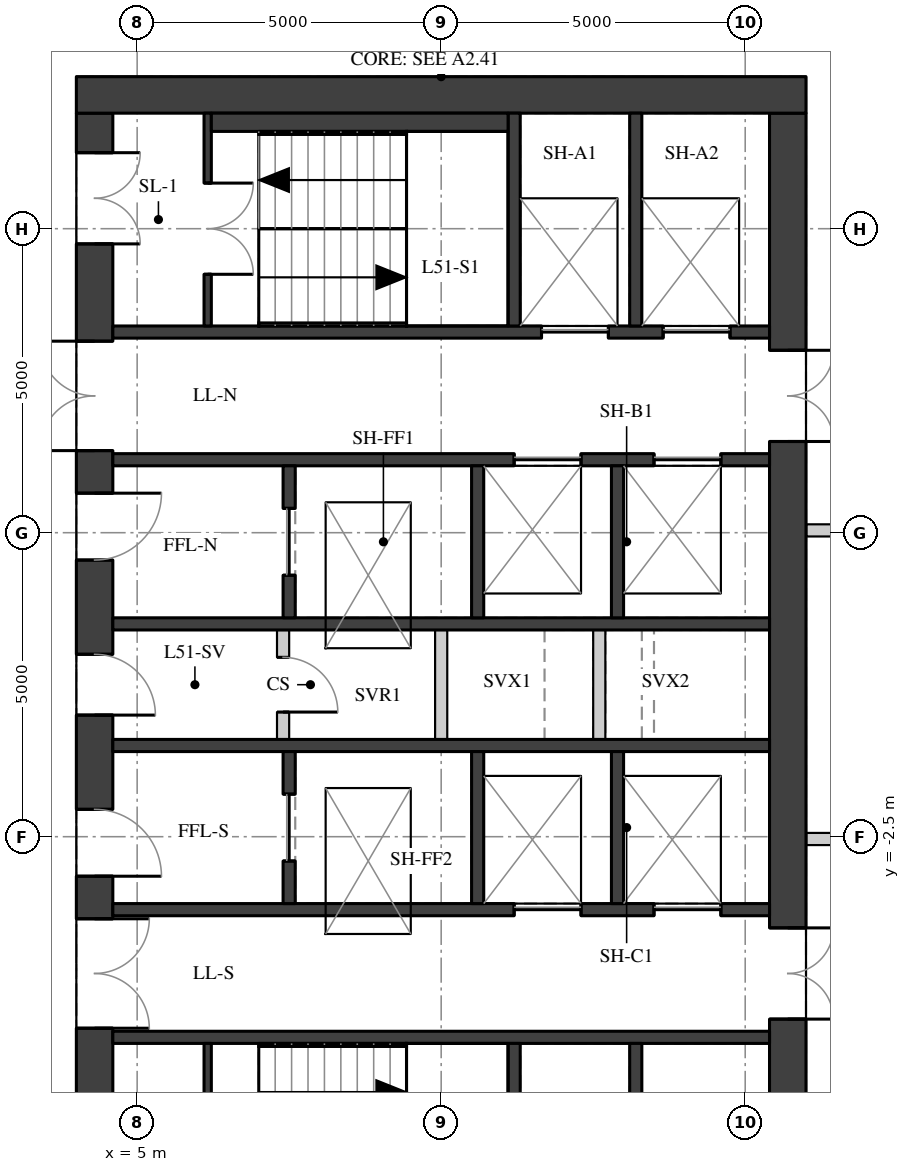
"""IFC4 building model, lengths in metres.
Left out: names, types, materials, properties, quantities, classifications, styles, units other than length and angle.
Written with IfcOpenShell. Run it as: python <this file> out.ifc"""

import sys

from ifc_helpers import new_model, si_unit, direction, frame, frame_2d, origin, place, context, subcontext, project, spatial, rectangle, extrude, element, fill, save


model = new_model("IFC4")
c1 = context("Model", 3, precision=1e-05, world=origin(), true_north=direction((0.0, 1.0)))
c2 = subcontext(c1, "Body", "Model", "MODEL_VIEW")
j1 = project(units=[si_unit("LENGTHUNIT", "METRE"), si_unit("PLANEANGLEUNIT", "RADIAN")], contexts=[c1])
p1 = place(None, origin())
s1 = spatial("IfcSite", under=j1, at=p1, CompositionType="ELEMENT")
p2 = place(p1, origin())
s2 = spatial("IfcBuilding", under=s1, at=p2, CompositionType="ELEMENT")
p3 = place(p2, frame((0.0, 0.0, 181.4)))
s3 = spatial("IfcBuildingStorey", under=s2, at=p3, CompositionType="ELEMENT", Elevation=181.4)
p4 = place(p3, frame((4.3, -9.4, 0.0), z_axis=(0.0, 0.0, 1.0), x_axis=(0.0, 1.0, 0.0)))
e1 = element("IfcWall", 1, at=p4, inside=s3, PredefinedType="SHEAR", context=c2, shape_type="SweptSolid", body=[
    extrude(rectangle(XDim=18.8, YDim=0.6, at=frame_2d((9.4, 0.0))), origin(), (0.0, 0.0, 1.0), 2.85),
])
p5 = place(p4, frame((0.65, 0.0, 0.0)))
e2 = element("IfcOpeningElement", 2, at=p5, cuts=e1, PredefinedType="OPENING", context=c2, shape_type="SweptSolid", body=[
    extrude(rectangle(XDim=1.5, YDim=2.1, at=frame_2d((0.75, 1.05))), frame((0.0, 0.31, 0.0), z_axis=(0.0, -1.0, 0.0), x_axis=(1.0, 0.0, 0.0)), (0.0, 0.0, 1.0), 0.62),
])
p6 = place(p4, frame((3.75, 0.0, 0.0)))
e3 = element("IfcOpeningElement", 3, at=p6, cuts=e1, PredefinedType="OPENING", context=c2, shape_type="SweptSolid", body=[
    extrude(rectangle(XDim=1.8, YDim=2.1, at=frame_2d((0.9, 1.05))), frame((0.0, 0.31, 0.0), z_axis=(0.0, -1.0, 0.0), x_axis=(1.0, 0.0, 0.0)), (0.0, 0.0, 1.0), 0.62),
])
p7 = place(p4, frame((6.25, 0.0, 0.0)))
e4 = element("IfcOpeningElement", 4, at=p7, cuts=e1, PredefinedType="OPENING", context=c2, shape_type="SweptSolid", body=[
    extrude(rectangle(XDim=1.1, YDim=2.1, at=frame_2d((0.55, 1.05))), frame((0.0, 0.31, 0.0), z_axis=(0.0, -1.0, 0.0), x_axis=(1.0, 0.0, 0.0)), (0.0, 0.0, 1.0), 0.62),
])
p8 = place(p4, frame((8.9, 0.0, 0.0)))
e5 = element("IfcOpeningElement", 5, at=p8, cuts=e1, PredefinedType="OPENING", context=c2, shape_type="SweptSolid", body=[
    extrude(rectangle(XDim=1.0, YDim=2.1, at=frame_2d((0.5, 1.05))), frame((0.0, 0.31, 0.0), z_axis=(0.0, -1.0, 0.0), x_axis=(1.0, 0.0, 0.0)), (0.0, 0.0, 1.0), 0.62),
])
p9 = place(p4, frame((11.45, 0.0, 0.0)))
e6 = element("IfcOpeningElement", 6, at=p9, cuts=e1, PredefinedType="OPENING", context=c2, shape_type="SweptSolid", body=[
    extrude(rectangle(XDim=1.1, YDim=2.1, at=frame_2d((0.55, 1.05))), frame((0.0, 0.31, 0.0), z_axis=(0.0, -1.0, 0.0), x_axis=(1.0, 0.0, 0.0)), (0.0, 0.0, 1.0), 0.62),
])
p10 = place(p4, frame((13.25, 0.0, 0.0)))
e7 = element("IfcOpeningElement", 7, at=p10, cuts=e1, PredefinedType="OPENING", context=c2, shape_type="SweptSolid", body=[
    extrude(rectangle(XDim=1.8, YDim=2.1, at=frame_2d((0.9, 1.05))), frame((0.0, 0.31, 0.0), z_axis=(0.0, -1.0, 0.0), x_axis=(1.0, 0.0, 0.0)), (0.0, 0.0, 1.0), 0.62),
])
p11 = place(p4, frame((16.65, 0.0, 0.0)))
e8 = element("IfcOpeningElement", 8, at=p11, cuts=e1, PredefinedType="OPENING", context=c2, shape_type="SweptSolid", body=[
    extrude(rectangle(XDim=1.5, YDim=2.1, at=frame_2d((0.75, 1.05))), frame((0.0, 0.31, 0.0), z_axis=(0.0, -1.0, 0.0), x_axis=(1.0, 0.0, 0.0)), (0.0, 0.0, 1.0), 0.62),
])
p12 = place(p3, frame((15.7, -9.4, 0.0), z_axis=(0.0, 0.0, 1.0), x_axis=(0.0, 1.0, 0.0)))
e9 = element("IfcWall", 9, at=p12, inside=s3, PredefinedType="SHEAR", context=c2, shape_type="SweptSolid", body=[
    extrude(rectangle(XDim=18.8, YDim=0.6, at=frame_2d((9.4, 0.0))), origin(), (0.0, 0.0, 1.0), 2.85),
])
p13 = place(p12, frame((13.4, 0.0, 0.0)))
e10 = element("IfcOpeningElement", 10, at=p13, cuts=e9, PredefinedType="OPENING", context=c2, shape_type="SweptSolid", body=[
    extrude(rectangle(XDim=1.5, YDim=2.1, at=frame_2d((0.75, 1.05))), frame((0.0, 0.31, 0.0), z_axis=(0.0, -1.0, 0.0), x_axis=(1.0, 0.0, 0.0)), (0.0, 0.0, 1.0), 0.62),
])
p14 = place(p12, frame((3.9, 0.0, 0.0)))
e11 = element("IfcOpeningElement", 11, at=p14, cuts=e9, PredefinedType="OPENING", context=c2, shape_type="SweptSolid", body=[
    extrude(rectangle(XDim=1.5, YDim=2.1, at=frame_2d((0.75, 1.05))), frame((0.0, 0.31, 0.0), z_axis=(0.0, -1.0, 0.0), x_axis=(1.0, 0.0, 0.0)), (0.0, 0.0, 1.0), 0.62),
])
p15 = place(p3, frame((4.0, 9.7, 0.0), z_axis=(0.0, 0.0, 1.0), x_axis=(1.0, 0.0, 0.0)))
e12 = element("IfcWall", 12, at=p15, inside=s3, PredefinedType="SHEAR", context=c2, shape_type="SweptSolid", body=[
    extrude(rectangle(XDim=12.0, YDim=0.6, at=frame_2d((6.0, 0.0))), origin(), (0.0, 0.0, 1.0), 2.85),
])
p16 = place(p3, frame((4.6, 5.8, 0.0), z_axis=(0.0, 0.0, 1.0), x_axis=(1.0, 0.0, 0.0)))
e13 = element("IfcWall", 13, at=p16, inside=s3, PredefinedType="SHEAR", context=c2, shape_type="SweptSolid", body=[
    extrude(rectangle(XDim=10.8, YDim=0.2, at=frame_2d((5.4, 0.0))), origin(), (0.0, 0.0, 1.0), 2.85),
])
p17 = place(p16, frame((7.05, 0.0, 0.0)))
e14 = element("IfcOpeningElement", 14, at=p17, cuts=e13, PredefinedType="OPENING", context=c2, shape_type="SweptSolid", body=[
    extrude(rectangle(XDim=1.1, YDim=2.1, at=frame_2d((0.55, 1.05))), frame((0.0, 0.11, 0.0), z_axis=(0.0, -1.0, 0.0), x_axis=(1.0, 0.0, 0.0)), (0.0, 0.0, 1.0), 0.22),
])
p18 = place(p16, frame((9.05, 0.0, 0.0)))
e15 = element("IfcOpeningElement", 15, at=p18, cuts=e13, PredefinedType="OPENING", context=c2, shape_type="SweptSolid", body=[
    extrude(rectangle(XDim=1.1, YDim=2.1, at=frame_2d((0.55, 1.05))), frame((0.0, 0.11, 0.0), z_axis=(0.0, -1.0, 0.0), x_axis=(1.0, 0.0, 0.0)), (0.0, 0.0, 1.0), 0.22),
])
p19 = place(p3, frame((4.6, 3.7, 0.0), z_axis=(0.0, 0.0, 1.0), x_axis=(1.0, 0.0, 0.0)))
e16 = element("IfcWall", 16, at=p19, inside=s3, PredefinedType="SHEAR", context=c2, shape_type="SweptSolid", body=[
    extrude(rectangle(XDim=10.8, YDim=0.2, at=frame_2d((5.4, 0.0))), origin(), (0.0, 0.0, 1.0), 2.85),
])
p20 = place(p19, frame((6.6, 0.0, 0.0)))
e17 = element("IfcOpeningElement", 17, at=p20, cuts=e16, PredefinedType="OPENING", context=c2, shape_type="SweptSolid", body=[
    extrude(rectangle(XDim=1.1, YDim=2.1, at=frame_2d((0.55, 1.05))), frame((0.0, 0.11, 0.0), z_axis=(0.0, -1.0, 0.0), x_axis=(1.0, 0.0, 0.0)), (0.0, 0.0, 1.0), 0.22),
])
p21 = place(p19, frame((8.9, 0.0, 0.0)))
e18 = element("IfcOpeningElement", 18, at=p21, cuts=e16, PredefinedType="OPENING", context=c2, shape_type="SweptSolid", body=[
    extrude(rectangle(XDim=1.1, YDim=2.1, at=frame_2d((0.55, 1.05))), frame((0.0, 0.11, 0.0), z_axis=(0.0, -1.0, 0.0), x_axis=(1.0, 0.0, 0.0)), (0.0, 0.0, 1.0), 0.22),
])
for number, where, z_axis, x_axis in (
    (19, (4.6, 1.0, 0.0), (0.0, 0.0, 1.0), (1.0, 0.0, 0.0)),
    (20, (4.6, -1.0, 0.0), (0.0, 0.0, 1.0), (1.0, 0.0, 0.0)),
):
    element("IfcWall", number, at=place(p3, frame(where, z_axis=z_axis, x_axis=x_axis)), inside=s3, PredefinedType="SHEAR", context=c2, shape_type="SweptSolid", body=[
        extrude(rectangle(XDim=10.8, YDim=0.2, at=frame_2d((5.4, 0.0))), origin(), (0.0, 0.0, 1.0), 2.85),
    ])
p22 = place(p3, frame((4.6, -3.7, 0.0), z_axis=(0.0, 0.0, 1.0), x_axis=(1.0, 0.0, 0.0)))
e21 = element("IfcWall", 21, at=p22, inside=s3, PredefinedType="SHEAR", context=c2, shape_type="SweptSolid", body=[
    extrude(rectangle(XDim=10.8, YDim=0.2, at=frame_2d((5.4, 0.0))), origin(), (0.0, 0.0, 1.0), 2.85),
])
p23 = place(p22, frame((6.6, 0.0, 0.0)))
e22 = element("IfcOpeningElement", 22, at=p23, cuts=e21, PredefinedType="OPENING", context=c2, shape_type="SweptSolid", body=[
    extrude(rectangle(XDim=1.1, YDim=2.1, at=frame_2d((0.55, 1.05))), frame((0.0, 0.11, 0.0), z_axis=(0.0, -1.0, 0.0), x_axis=(1.0, 0.0, 0.0)), (0.0, 0.0, 1.0), 0.22),
])
p24 = place(p22, frame((8.9, 0.0, 0.0)))
e23 = element("IfcOpeningElement", 23, at=p24, cuts=e21, PredefinedType="OPENING", context=c2, shape_type="SweptSolid", body=[
    extrude(rectangle(XDim=1.1, YDim=2.1, at=frame_2d((0.55, 1.05))), frame((0.0, 0.11, 0.0), z_axis=(0.0, -1.0, 0.0), x_axis=(1.0, 0.0, 0.0)), (0.0, 0.0, 1.0), 0.22),
])
p25 = place(p3, frame((4.6, -5.8, 0.0), z_axis=(0.0, 0.0, 1.0), x_axis=(1.0, 0.0, 0.0)))
e24 = element("IfcWall", 24, at=p25, inside=s3, PredefinedType="SHEAR", context=c2, shape_type="SweptSolid", body=[
    extrude(rectangle(XDim=10.8, YDim=0.2, at=frame_2d((5.4, 0.0))), origin(), (0.0, 0.0, 1.0), 2.85),
])
for number, where, z_axis, x_axis in (
    (25, (11.2, 5.9, 0.0), (0.0, 0.0, 1.0), (0.0, 1.0, 0.0)),
    (26, (11.2, -9.4, 0.0), (0.0, 0.0, 1.0), (0.0, 1.0, 0.0)),
    (27, (13.2, 5.9, 0.0), (0.0, 0.0, 1.0), (0.0, 1.0, 0.0)),
    (28, (13.2, -9.4, 0.0), (0.0, 0.0, 1.0), (0.0, 1.0, 0.0)),
):
    element("IfcWall", number, at=place(p3, frame(where, z_axis=z_axis, x_axis=x_axis)), inside=s3, PredefinedType="SHEAR", context=c2, shape_type="SweptSolid", body=[
        extrude(rectangle(XDim=3.5, YDim=0.2, at=frame_2d((1.75, 0.0))), origin(), (0.0, 0.0, 1.0), 2.85),
    ])
p26 = place(p3, frame((7.5, 1.1, 0.0), z_axis=(0.0, 0.0, 1.0), x_axis=(0.0, 1.0, 0.0)))
e29 = element("IfcWall", 29, at=p26, inside=s3, PredefinedType="SHEAR", context=c2, shape_type="SweptSolid", body=[
    extrude(rectangle(XDim=2.5, YDim=0.2, at=frame_2d((1.25, 0.0))), origin(), (0.0, 0.0, 1.0), 2.85),
])
p27 = place(p26, frame((0.7, 0.0, 0.0)))
e30 = element("IfcOpeningElement", 30, at=p27, cuts=e29, PredefinedType="OPENING", context=c2, shape_type="SweptSolid", body=[
    extrude(rectangle(XDim=1.1, YDim=2.1, at=frame_2d((0.55, 1.05))), frame((0.0, 0.11, 0.0), z_axis=(0.0, -1.0, 0.0), x_axis=(1.0, 0.0, 0.0)), (0.0, 0.0, 1.0), 0.22),
])
p28 = place(p3, frame((7.5, -3.6, 0.0), z_axis=(0.0, 0.0, 1.0), x_axis=(0.0, 1.0, 0.0)))
e31 = element("IfcWall", 31, at=p28, inside=s3, PredefinedType="SHEAR", context=c2, shape_type="SweptSolid", body=[
    extrude(rectangle(XDim=2.5, YDim=0.2, at=frame_2d((1.25, 0.0))), origin(), (0.0, 0.0, 1.0), 2.85),
])
p29 = place(p28, frame((0.7, 0.0, 0.0)))
e32 = element("IfcOpeningElement", 32, at=p29, cuts=e31, PredefinedType="OPENING", context=c2, shape_type="SweptSolid", body=[
    extrude(rectangle(XDim=1.1, YDim=2.1, at=frame_2d((0.55, 1.05))), frame((0.0, 0.11, 0.0), z_axis=(0.0, -1.0, 0.0), x_axis=(1.0, 0.0, 0.0)), (0.0, 0.0, 1.0), 0.22),
])
for number, where, z_axis, x_axis in (
    (33, (10.6, 1.1, 0.0), (0.0, 0.0, 1.0), (0.0, 1.0, 0.0)),
    (34, (10.6, -3.6, 0.0), (0.0, 0.0, 1.0), (0.0, 1.0, 0.0)),
    (35, (12.9, 1.1, 0.0), (0.0, 0.0, 1.0), (0.0, 1.0, 0.0)),
    (36, (12.9, -3.6, 0.0), (0.0, 0.0, 1.0), (0.0, 1.0, 0.0)),
):
    element("IfcWall", number, at=place(p3, frame(where, z_axis=z_axis, x_axis=x_axis)), inside=s3, PredefinedType="SHEAR", context=c2, shape_type="SweptSolid", body=[
        extrude(rectangle(XDim=2.5, YDim=0.2, at=frame_2d((1.25, 0.0))), origin(), (0.0, 0.0, 1.0), 2.85),
    ])
p30 = place(p3, frame((6.16, 5.9, 0.0), z_axis=(0.0, 0.0, 1.0), x_axis=(0.0, 1.0, 0.0)))
e37 = element("IfcWall", 37, at=p30, inside=s3, PredefinedType="SHEAR", context=c2, shape_type="SweptSolid", body=[
    extrude(rectangle(XDim=3.5, YDim=0.12, at=frame_2d((1.75, 0.0))), origin(), (0.0, 0.0, 1.0), 2.85),
])
p31 = place(p30, frame((0.85, 0.0, 0.0)))
e38 = element("IfcOpeningElement", 38, at=p31, cuts=e37, PredefinedType="OPENING", context=c2, shape_type="SweptSolid", body=[
    extrude(rectangle(XDim=1.5, YDim=2.1, at=frame_2d((0.75, 1.05))), frame((0.0, 0.07, 0.0), z_axis=(0.0, -1.0, 0.0), x_axis=(1.0, 0.0, 0.0)), (0.0, 0.0, 1.0), 0.14),
])
p32 = place(p3, frame((6.16, -9.4, 0.0), z_axis=(0.0, 0.0, 1.0), x_axis=(0.0, 1.0, 0.0)))
e39 = element("IfcWall", 39, at=p32, inside=s3, PredefinedType="SHEAR", context=c2, shape_type="SweptSolid", body=[
    extrude(rectangle(XDim=3.5, YDim=0.12, at=frame_2d((1.75, 0.0))), origin(), (0.0, 0.0, 1.0), 2.85),
])
p33 = place(p32, frame((1.15, 0.0, 0.0)))
e40 = element("IfcOpeningElement", 40, at=p33, cuts=e39, PredefinedType="OPENING", context=c2, shape_type="SweptSolid", body=[
    extrude(rectangle(XDim=1.5, YDim=2.1, at=frame_2d((0.75, 1.05))), frame((0.0, 0.07, 0.0), z_axis=(0.0, -1.0, 0.0), x_axis=(1.0, 0.0, 0.0)), (0.0, 0.0, 1.0), 0.14),
])
p34 = place(p3, frame((7.4, -0.9, 0.0), z_axis=(0.0, 0.0, 1.0), x_axis=(0.0, 1.0, 0.0)))
e41 = element("IfcWall", 41, at=p34, inside=s3, PredefinedType="PARTITIONING", context=c2, shape_type="SweptSolid", body=[
    extrude(rectangle(XDim=1.8, YDim=0.2, at=frame_2d((0.9, 0.0))), origin(), (0.0, 0.0, 1.0), 2.85),
])
p35 = place(p34, frame((0.45, 0.0, 0.0)))
e42 = element("IfcOpeningElement", 42, at=p35, cuts=e41, PredefinedType="OPENING", context=c2, shape_type="SweptSolid", body=[
    extrude(rectangle(XDim=0.9, YDim=2.1, at=frame_2d((0.45, 1.05))), frame((0.0, 0.11, 0.0), z_axis=(0.0, -1.0, 0.0), x_axis=(1.0, 0.0, 0.0)), (0.0, 0.0, 1.0), 0.22),
])
for number, where, z_axis, x_axis in (
    (43, (10.0, -0.9, 0.0), (0.0, 0.0, 1.0), (0.0, 1.0, 0.0)),
    (44, (12.6, -0.9, 0.0), (0.0, 0.0, 1.0), (0.0, 1.0, 0.0)),
):
    element("IfcWall", number, at=place(p3, frame(where, z_axis=z_axis, x_axis=x_axis)), inside=s3, PredefinedType="PARTITIONING", context=c2, shape_type="SweptSolid", body=[
        extrude(rectangle(XDim=1.8, YDim=0.2, at=frame_2d((0.9, 0.0))), origin(), (0.0, 0.0, 1.0), 2.85),
    ])
p36 = place(p3, frame((6.22, 9.25, 0.0), z_axis=(0.0, 0.0, 1.0), x_axis=(1.0, 0.0, 0.0)))
e45 = element("IfcWall", 45, at=p36, inside=s3, PredefinedType="PARTITIONING", context=c2, shape_type="SweptSolid", body=[
    extrude(rectangle(XDim=4.88, YDim=0.3, at=frame_2d((2.44, 0.0))), origin(), (0.0, 0.0, 1.0), 2.85),
])
p37 = place(p3, frame((17.5, 2.538, 0.0), z_axis=(0.0, 0.0, 1.0), x_axis=(-1.0, 0.0, 0.0)))
e46 = element("IfcWall", 46, at=p37, inside=s3, PredefinedType="PARTITIONING", context=c2, shape_type="SweptSolid", body=[
    extrude(rectangle(XDim=1.496, YDim=0.2, at=frame_2d((0.748, 0.0))), origin(), (0.0, 0.0, 1.0), 2.85),
])
p38 = place(p3, frame((16.004, -2.538, 0.0), z_axis=(0.0, 0.0, 1.0), x_axis=(1.0, 0.0, 0.0)))
e47 = element("IfcWall", 47, at=p38, inside=s3, PredefinedType="PARTITIONING", context=c2, shape_type="SweptSolid", body=[
    extrude(rectangle(XDim=1.596, YDim=0.2, at=frame_2d((0.798, 0.0))), origin(), (0.0, 0.0, 1.0), 2.85),
])
p39 = place(p6, origin())
e48 = element("IfcDoor", 48, at=p39, inside=s3, OperationType="DOUBLE_DOOR_SINGLE_SWING", PredefinedType="DOOR", context=c2, shape_type="SweptSolid", body=[
    extrude(rectangle(XDim=1.8, YDim=2.1, at=frame_2d((0.9, 1.05))), frame((0.0, 0.025, 0.0), z_axis=(0.0, -1.0, 0.0), x_axis=(1.0, 0.0, 0.0)), (0.0, 0.0, 1.0), 0.05),
])
fill(e3, e48)
p40 = place(p7, origin())
e49 = element("IfcDoor", 49, at=p40, inside=s3, OperationType="SINGLE_SWING_RIGHT", PredefinedType="DOOR", context=c2, shape_type="SweptSolid", body=[
    extrude(rectangle(XDim=1.1, YDim=2.1, at=frame_2d((0.55, 1.05))), frame((0.0, 0.025, 0.0), z_axis=(0.0, -1.0, 0.0), x_axis=(1.0, 0.0, 0.0)), (0.0, 0.0, 1.0), 0.05),
])
fill(e4, e49)
p41 = place(p8, origin())
e50 = element("IfcDoor", 50, at=p41, inside=s3, OperationType="SINGLE_SWING_RIGHT", PredefinedType="DOOR", context=c2, shape_type="SweptSolid", body=[
    extrude(rectangle(XDim=1.0, YDim=2.1, at=frame_2d((0.5, 1.05))), frame((0.0, 0.025, 0.0), z_axis=(0.0, -1.0, 0.0), x_axis=(1.0, 0.0, 0.0)), (0.0, 0.0, 1.0), 0.05),
])
fill(e5, e50)
p42 = place(p9, origin())
e51 = element("IfcDoor", 51, at=p42, inside=s3, OperationType="SINGLE_SWING_LEFT", PredefinedType="DOOR", context=c2, shape_type="SweptSolid", body=[
    extrude(rectangle(XDim=1.1, YDim=2.1, at=frame_2d((0.55, 1.05))), frame((0.0, 0.025, 0.0), z_axis=(0.0, -1.0, 0.0), x_axis=(1.0, 0.0, 0.0)), (0.0, 0.0, 1.0), 0.05),
])
fill(e6, e51)
p43 = place(p10, origin())
e52 = element("IfcDoor", 52, at=p43, inside=s3, OperationType="DOUBLE_DOOR_SINGLE_SWING", PredefinedType="DOOR", context=c2, shape_type="SweptSolid", body=[
    extrude(rectangle(XDim=1.8, YDim=2.1, at=frame_2d((0.9, 1.05))), frame((0.0, 0.025, 0.0), z_axis=(0.0, -1.0, 0.0), x_axis=(1.0, 0.0, 0.0)), (0.0, 0.0, 1.0), 0.05),
])
fill(e7, e52)
p44 = place(p11, origin())
e53 = element("IfcDoor", 53, at=p44, inside=s3, OperationType="DOUBLE_DOOR_SINGLE_SWING", PredefinedType="DOOR", context=c2, shape_type="SweptSolid", body=[
    extrude(rectangle(XDim=1.5, YDim=2.1, at=frame_2d((0.75, 1.05))), frame((0.0, 0.025, 0.0), z_axis=(0.0, -1.0, 0.0), x_axis=(1.0, 0.0, 0.0)), (0.0, 0.0, 1.0), 0.05),
])
fill(e8, e53)
p45 = place(p13, origin())
e54 = element("IfcDoor", 54, at=p45, inside=s3, OperationType="DOUBLE_DOOR_SINGLE_SWING", PredefinedType="DOOR", context=c2, shape_type="SweptSolid", body=[
    extrude(rectangle(XDim=1.5, YDim=2.1, at=frame_2d((0.75, 1.05))), frame((0.0, 0.025, 0.0), z_axis=(0.0, -1.0, 0.0), x_axis=(1.0, 0.0, 0.0)), (0.0, 0.0, 1.0), 0.05),
])
fill(e10, e54)
p46 = place(p14, origin())
e55 = element("IfcDoor", 55, at=p46, inside=s3, OperationType="DOUBLE_DOOR_SINGLE_SWING", PredefinedType="DOOR", context=c2, shape_type="SweptSolid", body=[
    extrude(rectangle(XDim=1.5, YDim=2.1, at=frame_2d((0.75, 1.05))), frame((0.0, 0.025, 0.0), z_axis=(0.0, -1.0, 0.0), x_axis=(1.0, 0.0, 0.0)), (0.0, 0.0, 1.0), 0.05),
])
fill(e11, e55)
p47 = place(p31, origin())
e56 = element("IfcDoor", 56, at=p47, inside=s3, OperationType="DOUBLE_DOOR_SINGLE_SWING", PredefinedType="DOOR", context=c2, shape_type="SweptSolid", body=[
    extrude(rectangle(XDim=1.5, YDim=2.1, at=frame_2d((0.75, 1.05))), frame((0.0, 0.025, 0.0), z_axis=(0.0, -1.0, 0.0), x_axis=(1.0, 0.0, 0.0)), (0.0, 0.0, 1.0), 0.05),
])
fill(e38, e56)
p48 = place(p17, origin())
e57 = element("IfcDoor", 57, at=p48, inside=s3, OperationType="DOUBLE_DOOR_SLIDING", PredefinedType="DOOR", context=c2, shape_type="SweptSolid", body=[
    extrude(rectangle(XDim=1.1, YDim=2.1, at=frame_2d((0.55, 1.05))), frame((0.0, 0.025, 0.0), z_axis=(0.0, -1.0, 0.0), x_axis=(1.0, 0.0, 0.0)), (0.0, 0.0, 1.0), 0.05),
])
fill(e14, e57)
p49 = place(p18, origin())
e58 = element("IfcDoor", 58, at=p49, inside=s3, OperationType="DOUBLE_DOOR_SLIDING", PredefinedType="DOOR", context=c2, shape_type="SweptSolid", body=[
    extrude(rectangle(XDim=1.1, YDim=2.1, at=frame_2d((0.55, 1.05))), frame((0.0, 0.025, 0.0), z_axis=(0.0, -1.0, 0.0), x_axis=(1.0, 0.0, 0.0)), (0.0, 0.0, 1.0), 0.05),
])
fill(e15, e58)
p50 = place(p20, origin())
e59 = element("IfcDoor", 59, at=p50, inside=s3, OperationType="DOUBLE_DOOR_SLIDING", PredefinedType="DOOR", context=c2, shape_type="SweptSolid", body=[
    extrude(rectangle(XDim=1.1, YDim=2.1, at=frame_2d((0.55, 1.05))), frame((0.0, 0.025, 0.0), z_axis=(0.0, -1.0, 0.0), x_axis=(1.0, 0.0, 0.0)), (0.0, 0.0, 1.0), 0.05),
])
fill(e17, e59)
p51 = place(p21, origin())
e60 = element("IfcDoor", 60, at=p51, inside=s3, OperationType="DOUBLE_DOOR_SLIDING", PredefinedType="DOOR", context=c2, shape_type="SweptSolid", body=[
    extrude(rectangle(XDim=1.1, YDim=2.1, at=frame_2d((0.55, 1.05))), frame((0.0, 0.025, 0.0), z_axis=(0.0, -1.0, 0.0), x_axis=(1.0, 0.0, 0.0)), (0.0, 0.0, 1.0), 0.05),
])
fill(e18, e60)
p52 = place(p23, origin())
e61 = element("IfcDoor", 61, at=p52, inside=s3, OperationType="DOUBLE_DOOR_SLIDING", PredefinedType="DOOR", context=c2, shape_type="SweptSolid", body=[
    extrude(rectangle(XDim=1.1, YDim=2.1, at=frame_2d((0.55, 1.05))), frame((0.0, 0.025, 0.0), z_axis=(0.0, -1.0, 0.0), x_axis=(1.0, 0.0, 0.0)), (0.0, 0.0, 1.0), 0.05),
])
fill(e22, e61)
p53 = place(p24, origin())
e62 = element("IfcDoor", 62, at=p53, inside=s3, OperationType="DOUBLE_DOOR_SLIDING", PredefinedType="DOOR", context=c2, shape_type="SweptSolid", body=[
    extrude(rectangle(XDim=1.1, YDim=2.1, at=frame_2d((0.55, 1.05))), frame((0.0, 0.025, 0.0), z_axis=(0.0, -1.0, 0.0), x_axis=(1.0, 0.0, 0.0)), (0.0, 0.0, 1.0), 0.05),
])
fill(e23, e62)
p54 = place(p27, origin())
e63 = element("IfcDoor", 63, at=p54, inside=s3, OperationType="DOUBLE_DOOR_SLIDING", PredefinedType="DOOR", context=c2, shape_type="SweptSolid", body=[
    extrude(rectangle(XDim=1.1, YDim=2.1, at=frame_2d((0.55, 1.05))), frame((0.0, 0.025, 0.0), z_axis=(0.0, -1.0, 0.0), x_axis=(1.0, 0.0, 0.0)), (0.0, 0.0, 1.0), 0.05),
])
fill(e30, e63)
p55 = place(p29, origin())
e64 = element("IfcDoor", 64, at=p55, inside=s3, OperationType="DOUBLE_DOOR_SLIDING", PredefinedType="DOOR", context=c2, shape_type="SweptSolid", body=[
    extrude(rectangle(XDim=1.1, YDim=2.1, at=frame_2d((0.55, 1.05))), frame((0.0, 0.025, 0.0), z_axis=(0.0, -1.0, 0.0), x_axis=(1.0, 0.0, 0.0)), (0.0, 0.0, 1.0), 0.05),
])
fill(e32, e64)
p56 = place(p35, origin())
e65 = element("IfcDoor", 65, at=p56, inside=s3, OperationType="SINGLE_SWING_RIGHT", PredefinedType="DOOR", context=c2, shape_type="SweptSolid", body=[
    extrude(rectangle(XDim=0.9, YDim=2.1, at=frame_2d((0.45, 1.05))), frame((0.0, 0.025, 0.0), z_axis=(0.0, -1.0, 0.0), x_axis=(1.0, 0.0, 0.0)), (0.0, 0.0, 1.0), 0.05),
])
fill(e42, e65)
save(model, sys.argv[1])
